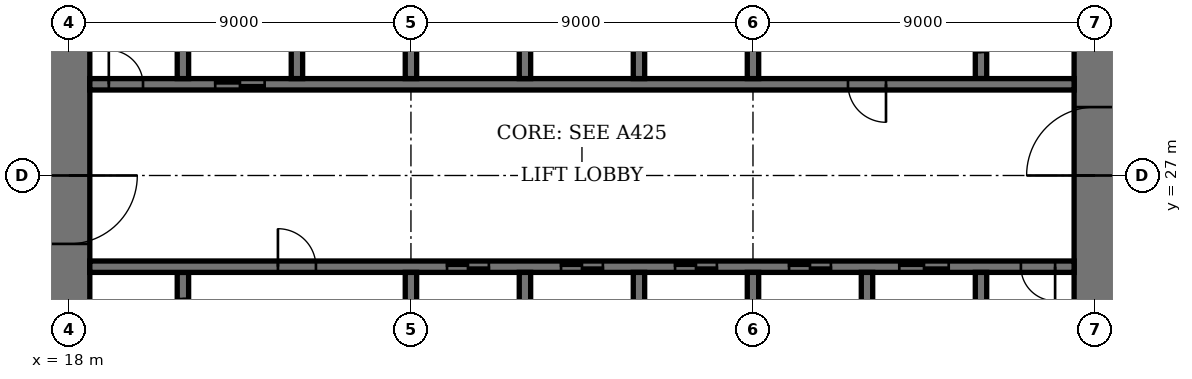
"""IFC4 building model, lengths in metres.
Left out: names, types, materials, properties, quantities, classifications, styles, units other than length and angle.
Written with IfcOpenShell. Run it as: python <this file> out.ifc"""

import sys

from ifc_helpers import new_model, si_unit, direction, frame, frame_2d, origin, place, context, subcontext, project, spatial, rectangle, extrude, element, fill, save


model = new_model("IFC4")
c1 = context("Model", 3, precision=1e-05, world=origin(), true_north=direction((0.0, 1.0)))
c2 = subcontext(c1, "Body", "Model", "MODEL_VIEW")
j1 = project(units=[si_unit("LENGTHUNIT", "METRE"), si_unit("PLANEANGLEUNIT", "RADIAN")], contexts=[c1])
p1 = place(None, origin())
s1 = spatial("IfcSite", under=j1, at=p1, CompositionType="ELEMENT")
p2 = place(p1, origin())
s2 = spatial("IfcBuilding", under=s1, at=p2, CompositionType="ELEMENT")
p3 = place(p2, frame((0.0, 0.0, 35.8)))
s3 = spatial("IfcBuildingStorey", under=s2, at=p3, CompositionType="ELEMENT", Elevation=35.8)
p4 = place(p3, frame((18.0, 35.45, 0.0), z_axis=(0.0, 0.0, 1.0), x_axis=(0.0, -1.0, 0.0)))
e1 = element("IfcWall", 1, at=p4, inside=s3, PredefinedType="SHEAR", context=c2, shape_type="SweptSolid", body=[
    extrude(rectangle(XDim=16.9, YDim=1.1, at=frame_2d((8.45, 0.0))), origin(), (0.0, 0.0, 1.0), 4.0),
])
p5 = place(p4, frame((8.45, 0.0, 0.0)))
e2 = element("IfcOpeningElement", 2, at=p5, cuts=e1, PredefinedType="OPENING", context=c2, shape_type="SweptSolid", body=[
    extrude(rectangle(XDim=1.8, YDim=2.4, at=frame_2d((0.9, 1.2))), frame((0.0, 0.56, 0.0), z_axis=(0.0, -1.0, 0.0), x_axis=(1.0, 0.0, 0.0)), (0.0, 0.0, 1.0), 1.12),
])
p6 = place(p3, frame((45.0, 18.55, 0.0), z_axis=(0.0, 0.0, 1.0), x_axis=(0.0, 1.0, 0.0)))
e3 = element("IfcWall", 3, at=p6, inside=s3, PredefinedType="SHEAR", context=c2, shape_type="SweptSolid", body=[
    extrude(rectangle(XDim=16.9, YDim=1.1, at=frame_2d((8.45, 0.0))), origin(), (0.0, 0.0, 1.0), 4.0),
])
p7 = place(p6, frame((8.45, 0.0, 0.0)))
e4 = element("IfcOpeningElement", 4, at=p7, cuts=e3, PredefinedType="OPENING", context=c2, shape_type="SweptSolid", body=[
    extrude(rectangle(XDim=1.8, YDim=2.4, at=frame_2d((0.9, 1.2))), frame((0.0, 0.56, 0.0), z_axis=(0.0, -1.0, 0.0), x_axis=(1.0, 0.0, 0.0)), (0.0, 0.0, 1.0), 1.12),
])
p8 = place(p3, frame((21.0, 21.95, 0.0), z_axis=(0.0, 0.0, 1.0), x_axis=(0.0, 1.0, 0.0)))
e5 = element("IfcWall", 5, at=p8, inside=s3, PredefinedType="SHEAR", context=c2, shape_type="SweptSolid", body=[
    extrude(rectangle(XDim=2.5, YDim=0.3, at=frame_2d((1.25, 0.0))), origin(), (0.0, 0.0, 1.0), 4.0),
])
p9 = place(p8, frame((0.7, 0.0, 0.0)))
e6 = element("IfcOpeningElement", 6, at=p9, cuts=e5, PredefinedType="OPENING", context=c2, shape_type="SweptSolid", body=[
    extrude(rectangle(XDim=1.1, YDim=2.4, at=frame_2d((0.55, 1.2))), frame((0.0, 0.16, 0.0), z_axis=(0.0, -1.0, 0.0), x_axis=(1.0, 0.0, 0.0)), (0.0, 0.0, 1.0), 0.32),
])
p10 = place(p3, frame((42.0, 29.55, 0.0), z_axis=(0.0, 0.0, 1.0), x_axis=(0.0, 1.0, 0.0)))
e7 = element("IfcWall", 7, at=p10, inside=s3, PredefinedType="SHEAR", context=c2, shape_type="SweptSolid", body=[
    extrude(rectangle(XDim=2.5, YDim=0.3, at=frame_2d((1.25, 0.0))), origin(), (0.0, 0.0, 1.0), 4.0),
])
p11 = place(p10, frame((0.7, 0.0, 0.0)))
e8 = element("IfcOpeningElement", 8, at=p11, cuts=e7, PredefinedType="OPENING", context=c2, shape_type="SweptSolid", body=[
    extrude(rectangle(XDim=1.1, YDim=2.4, at=frame_2d((0.55, 1.2))), frame((0.0, 0.16, 0.0), z_axis=(0.0, -1.0, 0.0), x_axis=(1.0, 0.0, 0.0)), (0.0, 0.0, 1.0), 0.32),
])
p12 = place(p3, frame((18.55, 24.6, 0.0), z_axis=(0.0, 0.0, 1.0), x_axis=(1.0, 0.0, 0.0)))
e9 = element("IfcWall", 9, at=p12, inside=s3, PredefinedType="SHEAR", context=c2, shape_type="SweptSolid", body=[
    extrude(rectangle(XDim=25.9, YDim=0.3, at=frame_2d((12.95, 0.0))), origin(), (0.0, 0.0, 1.0), 4.0),
])
p13 = place(p12, frame((4.95, 0.0, 0.0)))
e10 = element("IfcOpeningElement", 10, at=p13, cuts=e9, PredefinedType="OPENING", context=c2, shape_type="SweptSolid", body=[
    extrude(rectangle(XDim=1.0, YDim=2.4, at=frame_2d((0.5, 1.2))), frame((0.0, 0.16, 0.0), z_axis=(0.0, -1.0, 0.0), x_axis=(1.0, 0.0, 0.0)), (0.0, 0.0, 1.0), 0.32),
])
p14 = place(p12, frame((24.5, 0.0, 0.0)))
e11 = element("IfcOpeningElement", 11, at=p14, cuts=e9, PredefinedType="OPENING", context=c2, shape_type="SweptSolid", body=[
    extrude(rectangle(XDim=0.9, YDim=2.1, at=frame_2d((0.45, 1.05))), frame((0.0, 0.16, 0.0), z_axis=(0.0, -1.0, 0.0), x_axis=(1.0, 0.0, 0.0)), (0.0, 0.0, 1.0), 0.32),
])
p15 = place(p12, frame((9.4, 0.0, 0.0)))
e12 = element("IfcOpeningElement", 12, at=p15, cuts=e9, PredefinedType="OPENING", context=c2, shape_type="SweptSolid", body=[
    extrude(rectangle(XDim=1.1, YDim=2.4, at=frame_2d((0.55, 1.2))), frame((0.0, 0.16, 0.0), z_axis=(0.0, -1.0, 0.0), x_axis=(1.0, 0.0, 0.0)), (0.0, 0.0, 1.0), 0.32),
])
p16 = place(p12, frame((12.4, 0.0, 0.0)))
e13 = element("IfcOpeningElement", 13, at=p16, cuts=e9, PredefinedType="OPENING", context=c2, shape_type="SweptSolid", body=[
    extrude(rectangle(XDim=1.1, YDim=2.4, at=frame_2d((0.55, 1.2))), frame((0.0, 0.16, 0.0), z_axis=(0.0, -1.0, 0.0), x_axis=(1.0, 0.0, 0.0)), (0.0, 0.0, 1.0), 0.32),
])
p17 = place(p12, frame((15.4, 0.0, 0.0)))
e14 = element("IfcOpeningElement", 14, at=p17, cuts=e9, PredefinedType="OPENING", context=c2, shape_type="SweptSolid", body=[
    extrude(rectangle(XDim=1.1, YDim=2.4, at=frame_2d((0.55, 1.2))), frame((0.0, 0.16, 0.0), z_axis=(0.0, -1.0, 0.0), x_axis=(1.0, 0.0, 0.0)), (0.0, 0.0, 1.0), 0.32),
])
p18 = place(p12, frame((18.4, 0.0, 0.0)))
e15 = element("IfcOpeningElement", 15, at=p18, cuts=e9, PredefinedType="OPENING", context=c2, shape_type="SweptSolid", body=[
    extrude(rectangle(XDim=1.1, YDim=2.4, at=frame_2d((0.55, 1.2))), frame((0.0, 0.16, 0.0), z_axis=(0.0, -1.0, 0.0), x_axis=(1.0, 0.0, 0.0)), (0.0, 0.0, 1.0), 0.32),
])
p19 = place(p12, frame((21.3, 0.0, 0.0)))
e16 = element("IfcOpeningElement", 16, at=p19, cuts=e9, PredefinedType="OPENING", context=c2, shape_type="SweptSolid", body=[
    extrude(rectangle(XDim=1.3, YDim=2.4, at=frame_2d((0.65, 1.2))), frame((0.0, 0.16, 0.0), z_axis=(0.0, -1.0, 0.0), x_axis=(1.0, 0.0, 0.0)), (0.0, 0.0, 1.0), 0.32),
])
p20 = place(p3, frame((18.55, 29.4, 0.0), z_axis=(0.0, 0.0, 1.0), x_axis=(1.0, 0.0, 0.0)))
e17 = element("IfcWall", 17, at=p20, inside=s3, PredefinedType="SHEAR", context=c2, shape_type="SweptSolid", body=[
    extrude(rectangle(XDim=25.9, YDim=0.3, at=frame_2d((12.95, 0.0))), origin(), (0.0, 0.0, 1.0), 4.0),
])
p21 = place(p20, frame((19.95, 0.0, 0.0)))
e18 = element("IfcOpeningElement", 18, at=p21, cuts=e17, PredefinedType="OPENING", context=c2, shape_type="SweptSolid", body=[
    extrude(rectangle(XDim=1.0, YDim=2.4, at=frame_2d((0.5, 1.2))), frame((0.0, 0.16, 0.0), z_axis=(0.0, -1.0, 0.0), x_axis=(1.0, 0.0, 0.0)), (0.0, 0.0, 1.0), 0.32),
])
p22 = place(p20, frame((0.5, 0.0, 0.0)))
e19 = element("IfcOpeningElement", 19, at=p22, cuts=e17, PredefinedType="OPENING", context=c2, shape_type="SweptSolid", body=[
    extrude(rectangle(XDim=0.9, YDim=2.1, at=frame_2d((0.45, 1.05))), frame((0.0, 0.16, 0.0), z_axis=(0.0, -1.0, 0.0), x_axis=(1.0, 0.0, 0.0)), (0.0, 0.0, 1.0), 0.32),
])
p23 = place(p20, frame((3.3, 0.0, 0.0)))
e20 = element("IfcOpeningElement", 20, at=p23, cuts=e17, PredefinedType="OPENING", context=c2, shape_type="SweptSolid", body=[
    extrude(rectangle(XDim=1.3, YDim=2.4, at=frame_2d((0.65, 1.2))), frame((0.0, 0.16, 0.0), z_axis=(0.0, -1.0, 0.0), x_axis=(1.0, 0.0, 0.0)), (0.0, 0.0, 1.0), 0.32),
])
for number, where, z_axis, x_axis in (
    (21, (30.0, 21.75, 0.0), (0.0, 0.0, 1.0), (0.0, 1.0, 0.0)),
    (22, (33.0, 29.55, 0.0), (0.0, 0.0, 1.0), (0.0, 1.0, 0.0)),
    (23, (33.0, 21.75, 0.0), (0.0, 0.0, 1.0), (0.0, 1.0, 0.0)),
    (24, (30.0, 29.55, 0.0), (0.0, 0.0, 1.0), (0.0, 1.0, 0.0)),
    (25, (36.0, 21.75, 0.0), (0.0, 0.0, 1.0), (0.0, 1.0, 0.0)),
    (26, (27.0, 29.55, 0.0), (0.0, 0.0, 1.0), (0.0, 1.0, 0.0)),
):
    element("IfcWall", number, at=place(p3, frame(where, z_axis=z_axis, x_axis=x_axis)), inside=s3, PredefinedType="SHEAR", context=c2, shape_type="SweptSolid", body=[
        extrude(rectangle(XDim=2.7, YDim=0.3, at=frame_2d((1.35, 0.0))), origin(), (0.0, 0.0, 1.0), 4.0),
    ])
for number, where, z_axis, x_axis in (
    (27, (39.0, 18.55, 0.0), (0.0, 0.0, 1.0), (0.0, 1.0, 0.0)),
    (28, (24.0, 29.55, 0.0), (0.0, 0.0, 1.0), (0.0, 1.0, 0.0)),
):
    element("IfcWall", number, at=place(p3, frame(where, z_axis=z_axis, x_axis=x_axis)), inside=s3, PredefinedType="SHEAR", context=c2, shape_type="SweptSolid", body=[
        extrude(rectangle(XDim=5.9, YDim=0.3, at=frame_2d((2.95, 0.0))), origin(), (0.0, 0.0, 1.0), 4.0),
    ])
for number, where, z_axis, x_axis in (
    (29, (42.0, 21.75, 0.0), (0.0, 0.0, 1.0), (0.0, 1.0, 0.0)),
    (30, (21.0, 29.55, 0.0), (0.0, 0.0, 1.0), (0.0, 1.0, 0.0)),
):
    element("IfcWall", number, at=place(p3, frame(where, z_axis=z_axis, x_axis=x_axis)), inside=s3, PredefinedType="SHEAR", context=c2, shape_type="SweptSolid", body=[
        extrude(rectangle(XDim=2.7, YDim=0.3, at=frame_2d((1.35, 0.0))), origin(), (0.0, 0.0, 1.0), 4.0),
    ])
for number, where, z_axis, x_axis in (
    (31, (27.0, 21.6, 0.0), (0.0, 0.0, 1.0), (0.0, 1.0, 0.0)),
    (32, (36.0, 29.55, 0.0), (0.0, 0.0, 1.0), (0.0, 1.0, 0.0)),
):
    element("IfcWall", number, at=place(p3, frame(where, z_axis=z_axis, x_axis=x_axis)), inside=s3, PredefinedType="SHEAR", context=c2, shape_type="SweptSolid", body=[
        extrude(rectangle(XDim=2.85, YDim=0.3, at=frame_2d((1.425, 0.0))), origin(), (0.0, 0.0, 1.0), 4.0),
    ])
p24 = place(p5, origin())
e33 = element("IfcDoor", 33, at=p24, inside=s3, OperationType="DOUBLE_DOOR_DOUBLE_SWING", PredefinedType="DOOR", context=c2, shape_type="SweptSolid", body=[
    extrude(rectangle(XDim=1.8, YDim=2.4, at=frame_2d((0.9, 1.2))), frame((0.0, 0.03, 0.0), z_axis=(0.0, -1.0, 0.0), x_axis=(1.0, 0.0, 0.0)), (0.0, 0.0, 1.0), 0.06),
    extrude(rectangle(XDim=0.04, YDim=2.4, at=frame_2d((0.02, 1.2))), frame((0.0, 0.55, 0.0), z_axis=(0.0, -1.0, 0.0), x_axis=(1.0, 0.0, 0.0)), (0.0, 0.0, 1.0), 1.1),
    extrude(rectangle(XDim=0.04, YDim=2.4, at=frame_2d((1.78, 1.2))), frame((0.0, 0.55, 0.0), z_axis=(0.0, -1.0, 0.0), x_axis=(1.0, 0.0, 0.0)), (0.0, 0.0, 1.0), 1.1),
    extrude(rectangle(XDim=1.8, YDim=0.04, at=frame_2d((0.9, 2.38))), frame((0.0, 0.55, 0.0), z_axis=(0.0, -1.0, 0.0), x_axis=(1.0, 0.0, 0.0)), (0.0, 0.0, 1.0), 1.1),
])
fill(e2, e33)
p25 = place(p7, origin())
e34 = element("IfcDoor", 34, at=p25, inside=s3, OperationType="DOUBLE_DOOR_DOUBLE_SWING", PredefinedType="DOOR", context=c2, shape_type="SweptSolid", body=[
    extrude(rectangle(XDim=1.8, YDim=2.4, at=frame_2d((0.9, 1.2))), frame((0.0, 0.03, 0.0), z_axis=(0.0, -1.0, 0.0), x_axis=(1.0, 0.0, 0.0)), (0.0, 0.0, 1.0), 0.06),
    extrude(rectangle(XDim=0.04, YDim=2.4, at=frame_2d((0.02, 1.2))), frame((0.0, 0.55, 0.0), z_axis=(0.0, -1.0, 0.0), x_axis=(1.0, 0.0, 0.0)), (0.0, 0.0, 1.0), 1.1),
    extrude(rectangle(XDim=0.04, YDim=2.4, at=frame_2d((1.78, 1.2))), frame((0.0, 0.55, 0.0), z_axis=(0.0, -1.0, 0.0), x_axis=(1.0, 0.0, 0.0)), (0.0, 0.0, 1.0), 1.1),
    extrude(rectangle(XDim=1.8, YDim=0.04, at=frame_2d((0.9, 2.38))), frame((0.0, 0.55, 0.0), z_axis=(0.0, -1.0, 0.0), x_axis=(1.0, 0.0, 0.0)), (0.0, 0.0, 1.0), 1.1),
])
fill(e4, e34)
p26 = place(p13, origin())
e35 = element("IfcDoor", 35, at=p26, inside=s3, OperationType="SINGLE_SWING_RIGHT", PredefinedType="DOOR", context=c2, shape_type="SweptSolid", body=[
    extrude(rectangle(XDim=1.0, YDim=2.4, at=frame_2d((0.5, 1.2))), frame((0.0, 0.03, 0.0), z_axis=(0.0, -1.0, 0.0), x_axis=(1.0, 0.0, 0.0)), (0.0, 0.0, 1.0), 0.06),
])
fill(e10, e35)
p27 = place(p21, origin())
e36 = element("IfcDoor", 36, at=p27, inside=s3, OperationType="SINGLE_SWING_RIGHT", PredefinedType="DOOR", context=c2, shape_type="SweptSolid", body=[
    extrude(rectangle(XDim=1.0, YDim=2.4, at=frame_2d((0.5, 1.2))), frame((0.0, 0.03, 0.0), z_axis=(0.0, -1.0, 0.0), x_axis=(1.0, 0.0, 0.0)), (0.0, 0.0, 1.0), 0.06),
])
fill(e18, e36)
p28 = place(p14, origin())
e37 = element("IfcDoor", 37, at=p28, inside=s3, OperationType="SINGLE_SWING_RIGHT", PredefinedType="DOOR", context=c2, shape_type="SweptSolid", body=[
    extrude(rectangle(XDim=0.9, YDim=2.1, at=frame_2d((0.45, 1.05))), frame((0.0, 0.03, 0.0), z_axis=(0.0, -1.0, 0.0), x_axis=(1.0, 0.0, 0.0)), (0.0, 0.0, 1.0), 0.06),
])
fill(e11, e37)
p29 = place(p22, origin())
e38 = element("IfcDoor", 38, at=p29, inside=s3, OperationType="SINGLE_SWING_RIGHT", PredefinedType="DOOR", context=c2, shape_type="SweptSolid", body=[
    extrude(rectangle(XDim=0.9, YDim=2.1, at=frame_2d((0.45, 1.05))), frame((0.0, 0.03, 0.0), z_axis=(0.0, -1.0, 0.0), x_axis=(1.0, 0.0, 0.0)), (0.0, 0.0, 1.0), 0.06),
])
fill(e19, e38)
p30 = place(p15, origin())
e39 = element("IfcDoor", 39, at=p30, inside=s3, OperationType="DOUBLE_DOOR_SLIDING", PredefinedType="DOOR", context=c2, shape_type="SweptSolid", body=[
    extrude(rectangle(XDim=1.1, YDim=2.4, at=frame_2d((0.55, 1.2))), frame((0.0, 0.02, 0.0), z_axis=(0.0, -1.0, 0.0), x_axis=(1.0, 0.0, 0.0)), (0.0, 0.0, 1.0), 0.04),
])
fill(e12, e39)
p31 = place(p16, origin())
e40 = element("IfcDoor", 40, at=p31, inside=s3, OperationType="DOUBLE_DOOR_SLIDING", PredefinedType="DOOR", context=c2, shape_type="SweptSolid", body=[
    extrude(rectangle(XDim=1.1, YDim=2.4, at=frame_2d((0.55, 1.2))), frame((0.0, 0.02, 0.0), z_axis=(0.0, -1.0, 0.0), x_axis=(1.0, 0.0, 0.0)), (0.0, 0.0, 1.0), 0.04),
])
fill(e13, e40)
p32 = place(p17, origin())
e41 = element("IfcDoor", 41, at=p32, inside=s3, OperationType="DOUBLE_DOOR_SLIDING", PredefinedType="DOOR", context=c2, shape_type="SweptSolid", body=[
    extrude(rectangle(XDim=1.1, YDim=2.4, at=frame_2d((0.55, 1.2))), frame((0.0, 0.02, 0.0), z_axis=(0.0, -1.0, 0.0), x_axis=(1.0, 0.0, 0.0)), (0.0, 0.0, 1.0), 0.04),
])
fill(e14, e41)
p33 = place(p18, origin())
e42 = element("IfcDoor", 42, at=p33, inside=s3, OperationType="DOUBLE_DOOR_SLIDING", PredefinedType="DOOR", context=c2, shape_type="SweptSolid", body=[
    extrude(rectangle(XDim=1.1, YDim=2.4, at=frame_2d((0.55, 1.2))), frame((0.0, 0.02, 0.0), z_axis=(0.0, -1.0, 0.0), x_axis=(1.0, 0.0, 0.0)), (0.0, 0.0, 1.0), 0.04),
])
fill(e15, e42)
p34 = place(p19, origin())
e43 = element("IfcDoor", 43, at=p34, inside=s3, OperationType="DOUBLE_DOOR_SLIDING", PredefinedType="DOOR", context=c2, shape_type="SweptSolid", body=[
    extrude(rectangle(XDim=1.3, YDim=2.4, at=frame_2d((0.65, 1.2))), frame((0.0, 0.02, 0.0), z_axis=(0.0, -1.0, 0.0), x_axis=(1.0, 0.0, 0.0)), (0.0, 0.0, 1.0), 0.04),
])
fill(e16, e43)
p35 = place(p23, origin())
e44 = element("IfcDoor", 44, at=p35, inside=s3, OperationType="DOUBLE_DOOR_SLIDING", PredefinedType="DOOR", context=c2, shape_type="SweptSolid", body=[
    extrude(rectangle(XDim=1.3, YDim=2.4, at=frame_2d((0.65, 1.2))), frame((0.0, 0.02, 0.0), z_axis=(0.0, -1.0, 0.0), x_axis=(1.0, 0.0, 0.0)), (0.0, 0.0, 1.0), 0.04),
])
fill(e20, e44)
save(model, sys.argv[1])
